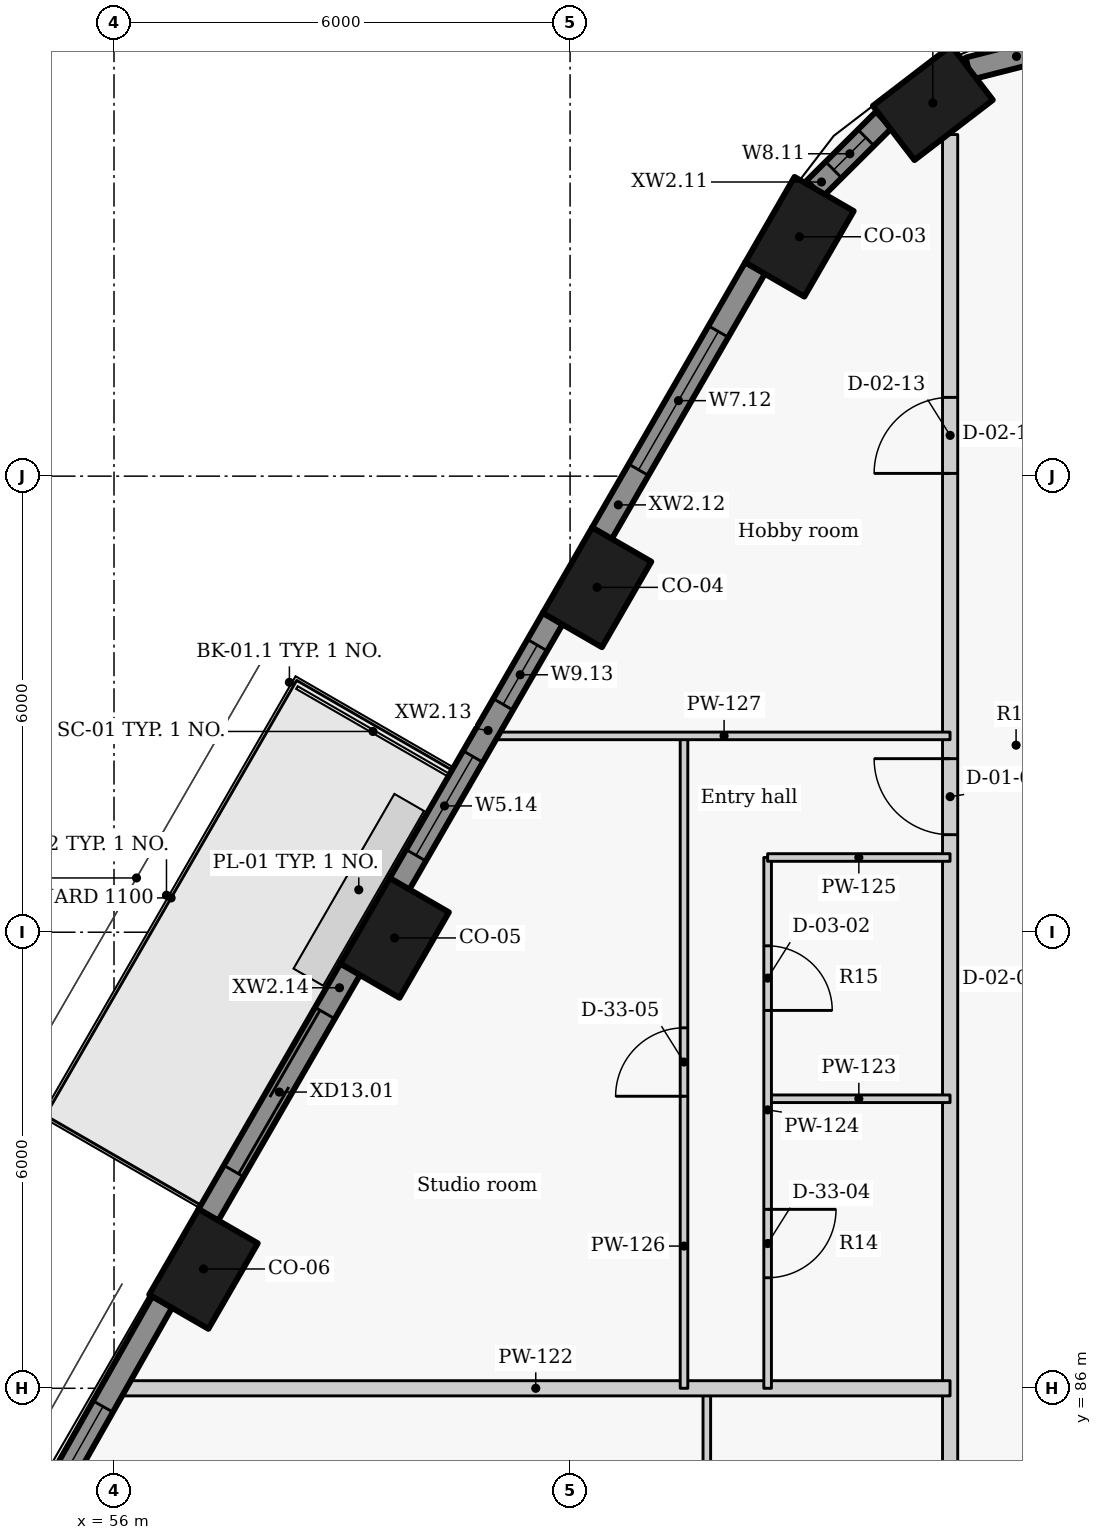
"""IFC4 building model, lengths in metres.
Left out: names, types, materials, properties, quantities, classifications, styles, units other than length and angle.
Written with IfcOpenShell. Run it as: python <this file> out.ifc"""

import sys

from ifc_helpers import new_model, si_unit, direction, frame, frame_2d, origin, origin_2d, place, context, subcontext, project, spatial, rectangle, extrude, element, fill, save


model = new_model("IFC4")
c1 = context("Model", 3, precision=1e-05, world=origin(), true_north=direction((0.0, 1.0)))
c2 = subcontext(c1, "Body", "Model", "MODEL_VIEW")
j1 = project(units=[si_unit("LENGTHUNIT", "METRE"), si_unit("PLANEANGLEUNIT", "RADIAN")], contexts=[c1])
p1 = place(None, origin())
s1 = spatial("IfcSite", under=j1, at=p1, CompositionType="ELEMENT")
p2 = place(p1, origin())
s2 = spatial("IfcBuilding", under=s1, at=p2, CompositionType="ELEMENT")
p3 = place(p2, frame((0.0, 0.0, 130.5)))
s3 = spatial("IfcBuildingStorey", under=s2, at=p3, CompositionType="ELEMENT", Elevation=130.5)
for number, where, z_axis, x_axis in (
    (1, (66.773, 102.91, 0.0), (0.0, 0.0, 1.0), (-0.793, -0.609, 0.0)),
    (2, (65.018, 101.149, 0.0), (0.0, 0.0, 1.0), (-0.5, -0.866, 0.0)),
    (3, (62.354, 96.537, 0.0), (0.0, 0.0, 1.0), (-0.5, -0.866, 0.0)),
    (4, (59.692, 91.925, 0.0), (0.0, 0.0, 1.0), (-0.5, -0.866, 0.0)),
    (5, (57.177, 87.57, 0.0), (0.0, 0.0, 1.0), (-0.5, -0.866, 0.0)),
):
    element("IfcColumn", number, at=place(p3, frame(where, z_axis=z_axis, x_axis=x_axis)), inside=s3, PredefinedType="COLUMN", context=c2, shape_type="SweptSolid", body=[
        extrude(rectangle(XDim=1.3, YDim=0.9, at=origin_2d()), origin(), (0.0, 0.0, 1.0), 3.3),
    ])
p4 = place(p3, frame((68.506, 103.683, 0.0), z_axis=(0.0, 0.0, 1.0), x_axis=(-0.96924493129, -0.246098076322, 0.0)))
e6 = element("IfcWall", 6, at=p4, inside=s3, PredefinedType="SOLIDWALL", context=c2, shape_type="SweptSolid", body=[
    extrude(rectangle(XDim=1.305, YDim=0.3, at=frame_2d((0.653, 0.0))), origin(), (0.0, 0.0, 1.0), 2.425),
])
p5 = place(p3, frame((66.129, 102.688, 0.0), z_axis=(0.0, 0.0, 1.0), x_axis=(-0.70881270082, -0.705396735997, 0.0)))
e7 = element("IfcWall", 7, at=p5, inside=s3, PredefinedType="SOLIDWALL", context=c2, shape_type="SweptSolid", body=[
    extrude(rectangle(XDim=1.286, YDim=0.3, at=frame_2d((0.643, 0.0))), origin(), (0.0, 0.0, 1.0), 2.425),
])
p6 = place(p5, frame((0.333, 0.0, 0.9)))
e8 = element("IfcOpeningElement", 8, at=p6, cuts=e7, PredefinedType="OPENING", context=c2, shape_type="SweptSolid", body=[
    extrude(rectangle(XDim=0.6, YDim=1.1, at=frame_2d((0.3, 0.55))), frame((0.0, 0.16, 0.0), z_axis=(0.0, -1.0, 0.0), x_axis=(1.0, 0.0, 0.0)), (0.0, 0.0, 1.0), 0.32),
])
p7 = place(p3, frame((64.435, 100.74, 0.0), z_axis=(0.0, 0.0, 1.0), x_axis=(-0.500031546601, -0.86600718958, 0.0)))
e9 = element("IfcWall", 9, at=p7, inside=s3, PredefinedType="SOLIDWALL", context=c2, shape_type="SweptSolid", body=[
    extrude(rectangle(XDim=4.034, YDim=0.3, at=frame_2d((2.017, 0.0))), origin(), (0.0, 0.0, 1.0), 2.425),
])
p8 = place(p7, frame((0.967, 0.0, 0.9)))
e10 = element("IfcOpeningElement", 10, at=p8, cuts=e9, PredefinedType="OPENING", context=c2, shape_type="SweptSolid", body=[
    extrude(rectangle(XDim=2.1, YDim=1.1, at=frame_2d((1.05, 0.55))), frame((0.0, 0.16, 0.0), z_axis=(0.0, -1.0, 0.0), x_axis=(1.0, 0.0, 0.0)), (0.0, 0.0, 1.0), 0.32),
])
p9 = place(p3, frame((61.772, 96.128, 0.0), z_axis=(0.0, 0.0, 1.0), x_axis=(-0.500031546601, -0.86600718958, 0.0)))
e11 = element("IfcWall", 11, at=p9, inside=s3, PredefinedType="SOLIDWALL", context=c2, shape_type="SweptSolid", body=[
    extrude(rectangle(XDim=4.034, YDim=0.3, at=frame_2d((2.017, 0.0))), origin(), (0.0, 0.0, 1.0), 2.425),
])
p10 = place(p9, frame((0.405, 0.0, 0.9)))
e12 = element("IfcOpeningElement", 12, at=p10, cuts=e11, PredefinedType="OPENING", context=c2, shape_type="SweptSolid", body=[
    extrude(rectangle(XDim=0.9, YDim=1.1, at=frame_2d((0.45, 0.55))), frame((0.0, 0.16, 0.0), z_axis=(0.0, -1.0, 0.0), x_axis=(1.0, 0.0, 0.0)), (0.0, 0.0, 1.0), 0.32),
])
p11 = place(p9, frame((2.098, 0.0, 0.9)))
e13 = element("IfcOpeningElement", 13, at=p11, cuts=e11, PredefinedType="OPENING", context=c2, shape_type="SweptSolid", body=[
    extrude(rectangle(XDim=1.5, YDim=1.1, at=frame_2d((0.75, 0.55))), frame((0.0, 0.16, 0.0), z_axis=(0.0, -1.0, 0.0), x_axis=(1.0, 0.0, 0.0)), (0.0, 0.0, 1.0), 0.32),
])
p12 = place(p3, frame((59.109, 91.515, 0.0), z_axis=(0.0, 0.0, 1.0), x_axis=(-0.499933594891, -0.866063739398, 0.0)))
e14 = element("IfcWall", 14, at=p12, inside=s3, PredefinedType="SOLIDWALL", context=c2, shape_type="SweptSolid", body=[
    extrude(rectangle(XDim=3.737, YDim=0.3, at=frame_2d((1.868, 0.0))), origin(), (0.0, 0.0, 1.0), 2.425),
])
p13 = place(p12, frame((0.668, 0.0, 0.0)))
e15 = element("IfcOpeningElement", 15, at=p13, cuts=e14, PredefinedType="OPENING", context=c2, shape_type="SweptSolid", body=[
    extrude(rectangle(XDim=2.4, YDim=2.0, at=frame_2d((1.2, 1.0))), frame((0.0, 0.16, 0.0), z_axis=(0.0, -1.0, 0.0), x_axis=(1.0, 0.0, 0.0)), (0.0, 0.0, 1.0), 0.32),
])
p14 = place(p3, frame((56.634, 87.137, 0.0), z_axis=(0.0, 0.0, 1.0), x_axis=(-0.492498306264, -0.87031340236, 0.0)))
e16 = element("IfcWall", 16, at=p14, inside=s3, PredefinedType="SOLIDWALL", context=c2, shape_type="SweptSolid", body=[
    extrude(rectangle(XDim=5.727, YDim=0.3, at=frame_2d((2.863, 0.0))), origin(), (0.0, 0.0, 1.0), 2.425),
])
p15 = place(p14, frame((1.582, 0.0, 0.9)))
e17 = element("IfcOpeningElement", 17, at=p15, cuts=e16, PredefinedType="OPENING", context=c2, shape_type="SweptSolid", body=[
    extrude(rectangle(XDim=2.1, YDim=1.1, at=frame_2d((1.05, 0.55))), frame((0.0, 0.16, 0.0), z_axis=(0.0, -1.0, 0.0), x_axis=(1.0, 0.0, 0.0)), (0.0, 0.0, 1.0), 0.32),
])
p16 = place(p3, frame((67.0, 56.833, 0.0), z_axis=(0.0, 0.0, 1.0), x_axis=(0.0, 1.0, 0.0)))
e18 = element("IfcWall", 18, at=p16, inside=s3, PredefinedType="PARTITIONING", context=c2, shape_type="SweptSolid", body=[
    extrude(rectangle(XDim=45.661, YDim=0.2, at=frame_2d((22.831, 0.0))), origin(), (0.0, 0.0, 1.0), 2.405),
])
p17 = place(p16, frame((8.084, 0.0, 0.0)))
e19 = element("IfcOpeningElement", 19, at=p17, cuts=e18, PredefinedType="OPENING", context=c2, shape_type="SweptSolid", body=[
    extrude(rectangle(XDim=1.0, YDim=2.1, at=frame_2d((0.5, 1.05))), frame((0.0, 0.11, 0.0), z_axis=(0.0, -1.0, 0.0), x_axis=(1.0, 0.0, 0.0)), (0.0, 0.0, 1.0), 0.22),
])
p18 = place(p16, frame((17.442, 0.0, 0.0)))
e20 = element("IfcOpeningElement", 20, at=p18, cuts=e18, PredefinedType="OPENING", context=c2, shape_type="SweptSolid", body=[
    extrude(rectangle(XDim=1.0, YDim=2.1, at=frame_2d((0.5, 1.05))), frame((0.0, 0.11, 0.0), z_axis=(0.0, -1.0, 0.0), x_axis=(1.0, 0.0, 0.0)), (0.0, 0.0, 1.0), 0.22),
])
p19 = place(p16, frame((36.45, 0.0, 0.0)))
e21 = element("IfcOpeningElement", 21, at=p19, cuts=e18, PredefinedType="OPENING", context=c2, shape_type="SweptSolid", body=[
    extrude(rectangle(XDim=1.0, YDim=2.1, at=frame_2d((0.5, 1.05))), frame((0.0, 0.11, 0.0), z_axis=(0.0, -1.0, 0.0), x_axis=(1.0, 0.0, 0.0)), (0.0, 0.0, 1.0), 0.22),
])
p20 = place(p16, frame((41.203, 0.0, 0.0)))
e22 = element("IfcOpeningElement", 22, at=p20, cuts=e18, PredefinedType="OPENING", context=c2, shape_type="SweptSolid", body=[
    extrude(rectangle(XDim=1.0, YDim=2.1, at=frame_2d((0.5, 1.05))), frame((0.0, 0.11, 0.0), z_axis=(0.0, -1.0, 0.0), x_axis=(1.0, 0.0, 0.0)), (0.0, 0.0, 1.0), 0.22),
])
p21 = place(p3, frame((63.799, 83.525, 0.0), z_axis=(0.0, 0.0, 1.0), x_axis=(0.0, 1.0, 0.0)))
e23 = element("IfcWall", 23, at=p21, inside=s3, PredefinedType="PARTITIONING", context=c2, shape_type="SweptSolid", body=[
    extrude(rectangle(XDim=2.475, YDim=0.1, at=frame_2d((1.238, 0.0))), origin(), (0.0, 0.0, 1.0), 3.025),
])
p22 = place(p3, frame((56.098, 86.0, 0.0), z_axis=(0.0, 0.0, 1.0), x_axis=(1.0, 0.0, 0.0)))
e24 = element("IfcWall", 24, at=p22, inside=s3, PredefinedType="PARTITIONING", context=c2, shape_type="SweptSolid", body=[
    extrude(rectangle(XDim=10.901, YDim=0.2, at=frame_2d((5.451, 0.0))), origin(), (0.0, 0.0, 1.0), 2.405),
])
p23 = place(p3, frame((64.599, 89.809, 0.0), z_axis=(0.0, 0.0, 1.0), x_axis=(1.0, 0.0, 0.0)))
e25 = element("IfcWall", 25, at=p23, inside=s3, PredefinedType="PARTITIONING", context=c2, shape_type="SweptSolid", body=[
    extrude(rectangle(XDim=2.4, YDim=0.1, at=frame_2d((1.2, 0.0))), origin(), (0.0, 0.0, 1.0), 3.025),
])
p24 = place(p3, frame((64.599, 92.983, 0.0), z_axis=(0.0, 0.0, 1.0), x_axis=(0.0, -1.0, 0.0)))
e26 = element("IfcWall", 26, at=p24, inside=s3, PredefinedType="PARTITIONING", context=c2, shape_type="SweptSolid", body=[
    extrude(rectangle(XDim=6.983, YDim=0.1, at=frame_2d((3.492, 0.0))), origin(), (0.0, 0.0, 1.0), 3.025),
])
p25 = place(p24, frame((4.629, 0.0, 0.0)))
e27 = element("IfcOpeningElement", 27, at=p25, cuts=e26, PredefinedType="OPENING", context=c2, shape_type="SweptSolid", body=[
    extrude(rectangle(XDim=0.9, YDim=2.1, at=frame_2d((0.45, 1.05))), frame((0.0, 0.06, 0.0), z_axis=(0.0, -1.0, 0.0), x_axis=(1.0, 0.0, 0.0)), (0.0, 0.0, 1.0), 0.12),
])
p26 = place(p24, frame((1.162, 0.0, 0.0)))
e28 = element("IfcOpeningElement", 28, at=p26, cuts=e26, PredefinedType="OPENING", context=c2, shape_type="SweptSolid", body=[
    extrude(rectangle(XDim=0.85, YDim=2.1, at=frame_2d((0.425, 1.05))), frame((0.0, 0.06, 0.0), z_axis=(0.0, -1.0, 0.0), x_axis=(1.0, 0.0, 0.0)), (0.0, 0.0, 1.0), 0.12),
])
p27 = place(p3, frame((64.599, 92.983, 0.0), z_axis=(0.0, 0.0, 1.0), x_axis=(1.0, 0.0, 0.0)))
e29 = element("IfcWall", 29, at=p27, inside=s3, PredefinedType="PARTITIONING", context=c2, shape_type="SweptSolid", body=[
    extrude(rectangle(XDim=2.4, YDim=0.1, at=frame_2d((1.2, 0.0))), origin(), (0.0, 0.0, 1.0), 3.025),
])
p28 = place(p3, frame((63.499, 86.0, 0.0), z_axis=(0.0, 0.0, 1.0), x_axis=(0.0, 1.0, 0.0)))
e30 = element("IfcWall", 30, at=p28, inside=s3, PredefinedType="PARTITIONING", context=c2, shape_type="SweptSolid", body=[
    extrude(rectangle(XDim=8.583, YDim=0.1, at=frame_2d((4.292, 0.0))), origin(), (0.0, 0.0, 1.0), 3.025),
])
p29 = place(p28, frame((3.842, 0.0, 0.0)))
e31 = element("IfcOpeningElement", 31, at=p29, cuts=e30, PredefinedType="OPENING", context=c2, shape_type="SweptSolid", body=[
    extrude(rectangle(XDim=0.9, YDim=2.1, at=frame_2d((0.45, 1.05))), frame((0.0, 0.06, 0.0), z_axis=(0.0, -1.0, 0.0), x_axis=(1.0, 0.0, 0.0)), (0.0, 0.0, 1.0), 0.12),
])
p30 = place(p3, frame((61.053, 94.583, 0.0), z_axis=(0.0, 0.0, 1.0), x_axis=(1.0, 0.0, 0.0)))
e32 = element("IfcWall", 32, at=p30, inside=s3, PredefinedType="PARTITIONING", context=c2, shape_type="SweptSolid", body=[
    extrude(rectangle(XDim=5.946, YDim=0.1, at=frame_2d((2.973, 0.0))), origin(), (0.0, 0.0, 1.0), 2.405),
])
p31 = place(p6, origin())
e33 = element("IfcWindow", 33, at=p31, inside=s3, PartitioningType="SINGLE_PANEL", PredefinedType="WINDOW", context=c2, shape_type="SweptSolid", body=[
    extrude(rectangle(XDim=0.6, YDim=1.1, at=frame_2d((0.3, 0.55))), frame((0.0, 0.03, 0.0), z_axis=(0.0, -1.0, 0.0), x_axis=(1.0, 0.0, 0.0)), (0.0, 0.0, 1.0), 0.06),
])
fill(e8, e33)
p32 = place(p8, origin())
e34 = element("IfcWindow", 34, at=p32, inside=s3, PartitioningType="SINGLE_PANEL", PredefinedType="WINDOW", context=c2, shape_type="SweptSolid", body=[
    extrude(rectangle(XDim=2.1, YDim=1.1, at=frame_2d((1.05, 0.55))), frame((0.0, 0.03, 0.0), z_axis=(0.0, -1.0, 0.0), x_axis=(1.0, 0.0, 0.0)), (0.0, 0.0, 1.0), 0.06),
])
fill(e10, e34)
p33 = place(p10, origin())
e35 = element("IfcWindow", 35, at=p33, inside=s3, PartitioningType="SINGLE_PANEL", PredefinedType="WINDOW", context=c2, shape_type="SweptSolid", body=[
    extrude(rectangle(XDim=0.9, YDim=1.1, at=frame_2d((0.45, 0.55))), frame((0.0, 0.03, 0.0), z_axis=(0.0, -1.0, 0.0), x_axis=(1.0, 0.0, 0.0)), (0.0, 0.0, 1.0), 0.06),
])
fill(e12, e35)
p34 = place(p11, origin())
e36 = element("IfcWindow", 36, at=p34, inside=s3, PartitioningType="SINGLE_PANEL", PredefinedType="WINDOW", context=c2, shape_type="SweptSolid", body=[
    extrude(rectangle(XDim=1.5, YDim=1.1, at=frame_2d((0.75, 0.55))), frame((0.0, 0.03, 0.0), z_axis=(0.0, -1.0, 0.0), x_axis=(1.0, 0.0, 0.0)), (0.0, 0.0, 1.0), 0.06),
])
fill(e13, e36)
p35 = place(p13, origin())
e37 = element("IfcDoor", 37, at=p35, inside=s3, OperationType="DOUBLE_DOOR_SLIDING", PredefinedType="DOOR", context=c2, shape_type="SweptSolid", body=[
    extrude(rectangle(XDim=2.4, YDim=2.0, at=frame_2d((1.2, 1.0))), frame((0.0, 0.025, 0.0), z_axis=(0.0, -1.0, 0.0), x_axis=(1.0, 0.0, 0.0)), (0.0, 0.0, 1.0), 0.05),
])
fill(e15, e37)
p36 = place(p15, origin())
e38 = element("IfcWindow", 38, at=p36, inside=s3, PartitioningType="SINGLE_PANEL", PredefinedType="WINDOW", context=c2, shape_type="SweptSolid", body=[
    extrude(rectangle(XDim=2.1, YDim=1.1, at=frame_2d((1.05, 0.55))), frame((0.0, 0.03, 0.0), z_axis=(0.0, -1.0, 0.0), x_axis=(1.0, 0.0, 0.0)), (0.0, 0.0, 1.0), 0.06),
])
fill(e17, e38)
p37 = place(p19, origin())
e39 = element("IfcDoor", 39, at=p37, inside=s3, OperationType="SINGLE_SWING_RIGHT", PredefinedType="DOOR", context=c2, shape_type="SweptSolid", body=[
    extrude(rectangle(XDim=1.0, YDim=2.1, at=frame_2d((0.5, 1.05))), frame((0.0, 0.025, 0.0), z_axis=(0.0, -1.0, 0.0), x_axis=(1.0, 0.0, 0.0)), (0.0, 0.0, 1.0), 0.05),
])
fill(e21, e39)
p38 = place(p25, origin())
e40 = element("IfcDoor", 40, at=p38, inside=s3, OperationType="SINGLE_SWING_LEFT", PredefinedType="DOOR", context=c2, shape_type="SweptSolid", body=[
    extrude(rectangle(XDim=0.9, YDim=2.1, at=frame_2d((0.45, 1.05))), frame((0.0, 0.025, 0.0), z_axis=(0.0, -1.0, 0.0), x_axis=(1.0, 0.0, 0.0)), (0.0, 0.0, 1.0), 0.05),
])
fill(e27, e40)
p39 = place(p26, origin())
e41 = element("IfcDoor", 41, at=p39, inside=s3, OperationType="SINGLE_SWING_RIGHT", PredefinedType="DOOR", context=c2, shape_type="SweptSolid", body=[
    extrude(rectangle(XDim=0.85, YDim=2.1, at=frame_2d((0.425, 1.05))), frame((0.0, 0.025, 0.0), z_axis=(0.0, -1.0, 0.0), x_axis=(1.0, 0.0, 0.0)), (0.0, 0.0, 1.0), 0.05),
])
fill(e28, e41)
p40 = place(p29, origin())
e42 = element("IfcDoor", 42, at=p40, inside=s3, OperationType="SINGLE_SWING_LEFT", PredefinedType="DOOR", context=c2, shape_type="SweptSolid", body=[
    extrude(rectangle(XDim=0.9, YDim=2.1, at=frame_2d((0.45, 1.05))), frame((0.0, 0.025, 0.0), z_axis=(0.0, -1.0, 0.0), x_axis=(1.0, 0.0, 0.0)), (0.0, 0.0, 1.0), 0.05),
])
fill(e31, e42)
p41 = place(p20, origin())
e43 = element("IfcDoor", 43, at=p41, inside=s3, OperationType="SINGLE_SWING_LEFT", PredefinedType="DOOR", context=c2, shape_type="SweptSolid", body=[
    extrude(rectangle(XDim=1.0, YDim=2.1, at=frame_2d((0.5, 1.05))), frame((0.0, 0.025, 0.0), z_axis=(0.0, -1.0, 0.0), x_axis=(1.0, 0.0, 0.0)), (0.0, 0.0, 1.0), 0.05),
])
fill(e22, e43)
save(model, sys.argv[1])
